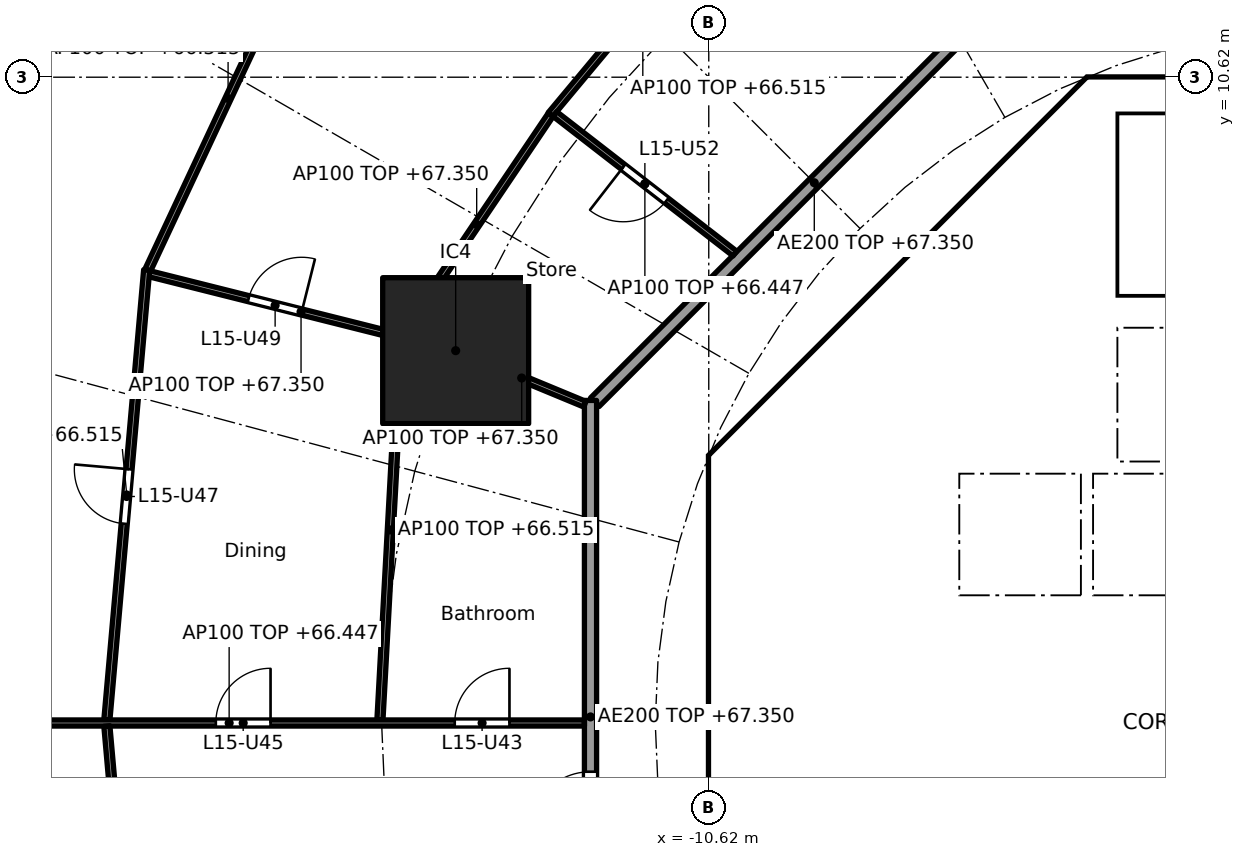
"""IFC4 building model, lengths in metres.
Left out: names, types, materials, properties, quantities, classifications, styles, units other than length and angle.
Written with IfcOpenShell. Run it as: python <this file> out.ifc"""

import sys

from ifc_helpers import new_model, si_unit, direction, frame, frame_2d, origin, origin_2d, place, context, subcontext, project, spatial, polyline, rectangle, outline, extrude, element, fill, save


model = new_model("IFC4")
c1 = context("Model", 3, precision=1e-05, world=origin(), true_north=direction((0.0, 1.0)))
c2 = subcontext(c1, "Body", "Model", "MODEL_VIEW")
j1 = project(units=[si_unit("LENGTHUNIT", "METRE"), si_unit("PLANEANGLEUNIT", "RADIAN")], contexts=[c1])
p1 = place(None, origin())
s1 = spatial("IfcSite", under=j1, at=p1, CompositionType="ELEMENT")
p2 = place(p1, origin())
s2 = spatial("IfcBuilding", under=s1, at=p2, CompositionType="ELEMENT")
p3 = place(p2, frame((0.0, 0.0, 64.0)))
s3 = spatial("IfcBuildingStorey", under=s2, at=p3, CompositionType="ELEMENT", Elevation=64.0)
p4 = place(p3, frame((-14.782, 6.123, 0.0), z_axis=(0.0, 0.0, 1.0), x_axis=(1.0, 0.0, 0.0)))
e1 = element("IfcColumn", 1, at=p4, inside=s3, PredefinedType="COLUMN", context=c2, shape_type="SweptSolid", body=[
    extrude(rectangle(XDim=2.4, YDim=2.4, at=origin_2d()), origin(), (0.0, 0.0, 1.0), 3.7),
])
p5 = place(p3, frame((-4.613, 9.988, 0.0), z_axis=(0.0, 0.0, 1.0), x_axis=(-0.707106781187, -0.707106781187, 0.0)))
e2 = element("IfcWall", 2, at=p5, inside=s3, PredefinedType="SHEAR", context=c2, shape_type="SweptSolid", body=[
    extrude(rectangle(XDim=7.602, YDim=0.6, at=frame_2d((3.801, 0.0))), origin(), (0.0, 0.0, 1.0), 3.35),
])
p6 = place(p5, frame((0.351, 0.0, 0.0)))
e3 = element("IfcOpeningElement", 3, at=p6, cuts=e2, PredefinedType="OPENING", context=c2, shape_type="SweptSolid", body=[
    extrude(rectangle(XDim=1.1, YDim=2.1, at=frame_2d((0.55, 1.05))), frame((0.0, 0.31, 0.0), z_axis=(0.0, -1.0, 0.0), x_axis=(1.0, 0.0, 0.0)), (0.0, 0.0, 1.0), 0.62),
])
p7 = place(p3, frame((-10.325, 3.801, 0.0), z_axis=(0.0, 0.0, 1.0), x_axis=(0.0, -1.0, 0.0)))
e4 = element("IfcWall", 4, at=p7, inside=s3, PredefinedType="SHEAR", context=c2, shape_type="SweptSolid", body=[
    extrude(rectangle(XDim=7.602, YDim=0.6, at=frame_2d((3.801, 0.0))), origin(), (0.0, 0.0, 1.0), 3.35),
])
p8 = place(p7, frame((0.651, 0.0, 0.0)))
e5 = element("IfcOpeningElement", 5, at=p8, cuts=e4, PredefinedType="OPENING", context=c2, shape_type="SweptSolid", body=[
    extrude(rectangle(XDim=1.5, YDim=2.1, at=frame_2d((0.75, 1.05))), frame((0.0, 0.31, 0.0), z_axis=(0.0, -1.0, 0.0), x_axis=(1.0, 0.0, 0.0)), (0.0, 0.0, 1.0), 0.62),
])
p9 = place(p7, frame((5.451, 0.0, 0.0)))
e6 = element("IfcOpeningElement", 6, at=p9, cuts=e4, PredefinedType="OPENING", context=c2, shape_type="SweptSolid", body=[
    extrude(rectangle(XDim=1.5, YDim=2.1, at=frame_2d((0.75, 1.05))), frame((0.0, 0.31, 0.0), z_axis=(0.0, -1.0, 0.0), x_axis=(1.0, 0.0, 0.0)), (0.0, 0.0, 1.0), 0.62),
])
p10 = place(p3, frame((-5.8, 4.3, 0.0), z_axis=(0.0, 0.0, 1.0), x_axis=(0.0, 1.0, 0.0)))
e7 = element("IfcWall", 7, at=p10, inside=s3, PredefinedType="PARTITIONING", context=c2, shape_type="SweptSolid", body=[
    extrude(rectangle(XDim=3.927, YDim=0.15, at=frame_2d((1.963, 0.0))), origin(), (0.0, 0.0, 1.0), 3.35),
])
p11 = place(p10, frame((0.413, 0.0, 0.0)))
e8 = element("IfcOpeningElement", 8, at=p11, cuts=e7, PredefinedType="OPENING", context=c2, shape_type="SweptSolid", body=[
    extrude(rectangle(XDim=0.9, YDim=2.1, at=frame_2d((0.45, 1.05))), frame((0.0, 0.085, 0.0), z_axis=(0.0, -1.0, 0.0), x_axis=(1.0, 0.0, 0.0)), (0.0, 0.0, 1.0), 0.17),
])
p12 = place(p10, frame((2.489, 0.0, 0.0)))
e9 = element("IfcOpeningElement", 9, at=p12, cuts=e7, PredefinedType="OPENING", context=c2, shape_type="SweptSolid", body=[
    extrude(rectangle(XDim=0.9, YDim=2.1, at=frame_2d((0.45, 1.05))), frame((0.0, 0.085, 0.0), z_axis=(0.0, -1.0, 0.0), x_axis=(1.0, 0.0, 0.0)), (0.0, 0.0, 1.0), 0.17),
])
p13 = place(p3, frame((-4.0, 4.3, 0.0), z_axis=(0.0, 0.0, 1.0), x_axis=(0.0, 1.0, 0.0)))
e10 = element("IfcWall", 10, at=p13, inside=s3, PredefinedType="SOLIDWALL", context=c2, shape_type="SweptSolid", body=[
    extrude(rectangle(XDim=2.2, YDim=0.2, at=frame_2d((1.1, 0.0))), origin(), (0.0, 0.0, 1.0), 3.35),
])
p14 = place(p13, frame((0.55, 0.0, 0.0)))
e11 = element("IfcOpeningElement", 11, at=p14, cuts=e10, PredefinedType="OPENING", context=c2, shape_type="SweptSolid", body=[
    extrude(rectangle(XDim=1.1, YDim=2.1, at=frame_2d((0.55, 1.05))), frame((0.0, 0.11, 0.0), z_axis=(0.0, -1.0, 0.0), x_axis=(1.0, 0.0, 0.0)), (0.0, 0.0, 1.0), 0.22),
])
p15 = place(p3, frame((-6.7, 2.0, 0.0), z_axis=(0.0, 0.0, 1.0), x_axis=(1.0, 0.0, 0.0)))
e12 = element("IfcWall", 12, at=p15, inside=s3, PredefinedType="SOLIDWALL", context=c2, shape_type="SweptSolid", body=[
    extrude(rectangle(XDim=13.4, YDim=0.2, at=frame_2d((6.7, 0.0))), origin(), (0.0, 0.0, 1.0), 3.35),
])
p16 = place(p15, frame((0.65, 0.0, 0.0)))
e13 = element("IfcOpeningElement", 13, at=p16, cuts=e12, PredefinedType="OPENING", context=c2, shape_type="SweptSolid", body=[
    extrude(rectangle(XDim=1.1, YDim=2.1, at=frame_2d((0.55, 1.05))), frame((0.0, 0.11, 0.0), z_axis=(0.0, -1.0, 0.0), x_axis=(1.0, 0.0, 0.0)), (0.0, 0.0, 1.0), 0.22),
])
p17 = place(p15, frame((2.85, 0.0, 0.0)))
e14 = element("IfcOpeningElement", 14, at=p17, cuts=e12, PredefinedType="OPENING", context=c2, shape_type="SweptSolid", body=[
    extrude(rectangle(XDim=1.1, YDim=2.1, at=frame_2d((0.55, 1.05))), frame((0.0, 0.11, 0.0), z_axis=(0.0, -1.0, 0.0), x_axis=(1.0, 0.0, 0.0)), (0.0, 0.0, 1.0), 0.22),
])
p18 = place(p15, frame((5.05, 0.0, 0.0)))
e15 = element("IfcOpeningElement", 15, at=p18, cuts=e12, PredefinedType="OPENING", context=c2, shape_type="SweptSolid", body=[
    extrude(rectangle(XDim=1.1, YDim=2.1, at=frame_2d((0.55, 1.05))), frame((0.0, 0.11, 0.0), z_axis=(0.0, -1.0, 0.0), x_axis=(1.0, 0.0, 0.0)), (0.0, 0.0, 1.0), 0.22),
])
p19 = place(p3, origin())
e16 = element("IfcWall", 16, at=p19, inside=s3, PredefinedType="SHEAR", context=c2, shape_type="SweptSolid", body=[
    extrude(outline(polyline([(-10.2, 4.825), (-9.776, 4.401), (-10.025, 4.152), (-10.025, 3.801), (-10.625, 3.801), (-10.625, 4.401), (-10.2, 4.825)])), origin(), (0.0, 0.0, 1.0), 3.35),
])
p20 = place(p3, origin())
e17 = element("IfcWall", 17, at=p20, inside=s3, PredefinedType="SHEAR", context=c2, shape_type="SweptSolid", body=[
    extrude(outline(polyline([(-4.152, 10.025), (-4.401, 9.776), (-4.825, 10.2), (-4.401, 10.625), (4.401, 10.625), (4.825, 10.2), (4.401, 9.776), (4.152, 10.025), (-4.152, 10.025)])), origin(), (0.0, 0.0, 1.0), 3.35),
])
p21 = place(p3, frame((-10.025, 4.0, 0.0), z_axis=(0.0, 0.0, 1.0), x_axis=(1.0, 0.0, 0.0)))
e18 = element("IfcWall", 18, at=p21, inside=s3, PredefinedType="PARTITIONING", context=c2, shape_type="SweptSolid", body=[
    extrude(rectangle(XDim=3.325, YDim=0.2, at=frame_2d((1.662, 0.0))), origin(), (0.0, 0.0, 1.0), 3.35),
])
p22 = place(p3, frame((-8.001, 6.1, 0.0), z_axis=(0.0, 0.0, 1.0), x_axis=(1.0, 0.0, 0.0)))
e19 = element("IfcWall", 19, at=p22, inside=s3, PredefinedType="PARTITIONING", context=c2, shape_type="SweptSolid", body=[
    extrude(rectangle(XDim=2.126, YDim=0.15, at=frame_2d((1.063, 0.0))), origin(), (0.0, 0.0, 1.0), 3.35),
])
p23 = place(p3, origin())
e20 = element("IfcWall", 20, at=p23, inside=s3, PredefinedType="SOLIDWALL", context=c2, shape_type="SweptSolid", body=[
    extrude(outline(polyline([(-6.5, 2.1), (-6.7, 2.1), (-6.7, 4.3), (6.7, 4.3), (6.7, 2.1), (6.5, 2.1), (6.5, 4.1), (4.5, 4.1), (4.5, 2.1), (4.3, 2.1), (4.3, 4.1), (2.3, 4.1), (2.3, 2.1), (2.1, 2.1), (2.1, 4.1), (0.1, 4.1), (0.1, 2.1), (-0.1, 2.1), (-0.1, 4.1), (-2.1, 4.1), (-2.1, 2.1), (-2.3, 2.1), (-2.3, 4.1), (-4.3, 4.1), (-4.3, 2.1), (-4.5, 2.1), (-4.5, 4.1), (-6.5, 4.1), (-6.5, 2.1)])), origin(), (0.0, 0.0, 1.0), 3.35),
])
p24 = place(p3, origin())
e21 = element("IfcWall", 21, at=p24, inside=s3, PredefinedType="SOLIDWALL", context=c2, shape_type="SweptSolid", body=[
    extrude(outline(polyline([(-3.9, 7.025), (-4.1, 7.025), (-4.1, 10.025), (-3.9, 10.025), (-3.9, 7.025)])), origin(), (0.0, 0.0, 1.0), 3.35),
])
p25 = place(p3, origin())
e22 = element("IfcWall", 22, at=p25, inside=s3, PredefinedType="SOLIDWALL", context=c2, shape_type="SweptSolid", body=[
    extrude(outline(polyline([(4.1, 6.5), (-4.1, 6.5), (-4.1, 7.025), (4.1, 7.025), (4.1, 6.5)])), origin(), (0.0, 0.0, 1.0), 3.35),
])
p26 = place(p3, frame((-5.275, 12.494, 0.0), z_axis=(0.0, 0.0, 1.0), x_axis=(-0.707106781187, -0.707106781187, 0.0)))
e23 = element("IfcWall", 23, at=p26, inside=s3, PredefinedType="PARTITIONING", context=c2, shape_type="SweptSolid", body=[
    extrude(rectangle(XDim=10.209, YDim=0.2, at=frame_2d((5.104, 0.0))), origin(), (0.0, 0.0, 1.0), 3.35),
])
p27 = place(p3, frame((-12.565, 5.304, 0.0), z_axis=(0.0, 0.0, 1.0), x_axis=(0.0, -1.0, 0.0)))
e24 = element("IfcWall", 24, at=p27, inside=s3, PredefinedType="PARTITIONING", context=c2, shape_type="SweptSolid", body=[
    extrude(rectangle(XDim=10.409, YDim=0.2, at=frame_2d((5.205, 0.0))), origin(), (0.0, 0.0, 1.0), 3.35),
])
p28 = place(p27, frame((6.106, 0.0, 0.0)))
e25 = element("IfcOpeningElement", 25, at=p28, cuts=e24, PredefinedType="OPENING", context=c2, shape_type="SweptSolid", body=[
    extrude(rectangle(XDim=1.0, YDim=2.1, at=frame_2d((0.5, 1.05))), frame((0.0, 0.11, 0.0), z_axis=(0.0, -1.0, 0.0), x_axis=(1.0, 0.0, 0.0)), (0.0, 0.0, 1.0), 0.22),
])
p29 = place(p3, frame((-10.187, 13.643, 0.0), z_axis=(0.0, 0.0, 1.0), x_axis=(-0.640807748916, -0.767701393075, 0.0)))
e26 = element("IfcWall", 26, at=p29, inside=s3, PredefinedType="PARTITIONING", context=c2, shape_type="SweptSolid", body=[
    extrude(rectangle(XDim=4.737, YDim=0.1, at=frame_2d((2.368, 0.0))), origin(), (0.0, 0.0, 1.0), 2.515),
])
p30 = place(p29, frame((1.893, 0.0, 0.0)))
e27 = element("IfcOpeningElement", 27, at=p30, cuts=e26, PredefinedType="OPENING", context=c2, shape_type="SweptSolid", body=[
    extrude(rectangle(XDim=0.9, YDim=2.1, at=frame_2d((0.45, 1.05))), frame((0.0, 0.06, 0.0), z_axis=(0.0, -1.0, 0.0), x_axis=(1.0, 0.0, 0.0)), (0.0, 0.0, 1.0), 0.12),
])
p31 = place(p3, frame((-10.19, 7.719, 0.0), z_axis=(0.0, 0.0, 1.0), x_axis=(-0.790253294643, 0.612780327937, 0.0)))
e28 = element("IfcWall", 28, at=p31, inside=s3, PredefinedType="PARTITIONING", context=c2, shape_type="SweptSolid", body=[
    extrude(rectangle(XDim=3.746, YDim=0.1, at=frame_2d((1.873, 0.0))), origin(), (0.0, 0.0, 1.0), 2.447),
])
p32 = place(p31, frame((1.423, 0.0, 0.0)))
e29 = element("IfcOpeningElement", 29, at=p32, cuts=e28, PredefinedType="OPENING", context=c2, shape_type="SweptSolid", body=[
    extrude(rectangle(XDim=0.9, YDim=2.1, at=frame_2d((0.45, 1.05))), frame((0.0, 0.06, 0.0), z_axis=(0.0, -1.0, 0.0), x_axis=(1.0, 0.0, 0.0)), (0.0, 0.0, 1.0), 0.12),
])
p33 = place(p3, frame((-13.218, 10.004, 0.0), z_axis=(0.0, 0.0, 1.0), x_axis=(-0.559126445155, -0.82908239538, 0.0)))
e30 = element("IfcWall", 30, at=p33, inside=s3, PredefinedType="PARTITIONING", context=c2, shape_type="SweptSolid", body=[
    extrude(rectangle(XDim=4.358, YDim=0.1, at=frame_2d((2.179, 0.0))), origin(), (0.0, 0.0, 1.0), 3.35),
])
p34 = place(p3, frame((-17.203, 13.095, 0.0), z_axis=(0.0, 0.0, 1.0), x_axis=(-0.423892287987, -0.905712607942, 0.0)))
e31 = element("IfcWall", 31, at=p34, inside=s3, PredefinedType="PARTITIONING", context=c2, shape_type="SweptSolid", body=[
    extrude(rectangle(XDim=6.238, YDim=0.1, at=frame_2d((3.119, 0.0))), origin(), (0.0, 0.0, 1.0), 2.515),
])
p35 = place(p3, frame((-12.657, 5.243, 0.0), z_axis=(0.0, 0.0, 1.0), x_axis=(-0.923864733477, 0.382719158442, 0.0)))
e32 = element("IfcWall", 32, at=p35, inside=s3, PredefinedType="PARTITIONING", context=c2, shape_type="SweptSolid", body=[
    extrude(rectangle(XDim=2.25, YDim=0.1, at=frame_2d((1.125, 0.0))), origin(), (0.0, 0.0, 1.0), 3.35),
])
p36 = place(p3, frame((-14.831, 6.135, 0.0), z_axis=(0.0, 0.0, 1.0), x_axis=(-0.96988230015, 0.243574062362, 0.0)))
e33 = element("IfcWall", 33, at=p36, inside=s3, PredefinedType="PARTITIONING", context=c2, shape_type="SweptSolid", body=[
    extrude(rectangle(XDim=5.144, YDim=0.1, at=frame_2d((2.572, 0.0))), origin(), (0.0, 0.0, 1.0), 3.35),
])
p37 = place(p36, frame((2.561, 0.0, 0.0)))
e34 = element("IfcOpeningElement", 34, at=p37, cuts=e33, PredefinedType="OPENING", context=c2, shape_type="SweptSolid", body=[
    extrude(rectangle(XDim=0.9, YDim=2.1, at=frame_2d((0.45, 1.05))), frame((0.0, 0.06, 0.0), z_axis=(0.0, -1.0, 0.0), x_axis=(1.0, 0.0, 0.0)), (0.0, 0.0, 1.0), 0.12),
])
p38 = place(p3, frame((-15.686, 6.299, 0.0), z_axis=(0.0, 0.0, 1.0), x_axis=(-0.054651178503, -0.99850550759, 0.0)))
e35 = element("IfcWall", 35, at=p38, inside=s3, PredefinedType="PARTITIONING", context=c2, shape_type="SweptSolid", body=[
    extrude(rectangle(XDim=6.259, YDim=0.1, at=frame_2d((3.129, 0.0))), origin(), (0.0, 0.0, 1.0), 2.515),
])
p39 = place(p3, frame((-19.864, 7.45, 0.0), z_axis=(0.0, 0.0, 1.0), x_axis=(-0.088138375539, -0.996108240483, 0.0)))
e36 = element("IfcWall", 36, at=p39, inside=s3, PredefinedType="PARTITIONING", context=c2, shape_type="SweptSolid", body=[
    extrude(rectangle(XDim=7.429, YDim=0.1, at=frame_2d((3.714, 0.0))), origin(), (0.0, 0.0, 1.0), 2.515),
])
p40 = place(p39, frame((3.29, 0.0, 0.0)))
e37 = element("IfcOpeningElement", 37, at=p40, cuts=e36, PredefinedType="OPENING", context=c2, shape_type="SweptSolid", body=[
    extrude(rectangle(XDim=0.9, YDim=2.1, at=frame_2d((0.45, 1.05))), frame((0.0, 0.06, 0.0), z_axis=(0.0, -1.0, 0.0), x_axis=(1.0, 0.0, 0.0)), (0.0, 0.0, 1.0), 0.12),
])
p41 = place(p3, frame((-12.665, 0.0, 0.0), z_axis=(0.0, 0.0, 1.0), x_axis=(-1.0, 0.0, 0.0)))
e38 = element("IfcWall", 38, at=p41, inside=s3, PredefinedType="PARTITIONING", context=c2, shape_type="SweptSolid", body=[
    extrude(rectangle(XDim=11.685, YDim=0.1, at=frame_2d((5.843, 0.0))), origin(), (0.0, 0.0, 1.0), 2.447),
])
p42 = place(p41, frame((1.233, 0.0, 0.0)))
e39 = element("IfcOpeningElement", 39, at=p42, cuts=e38, PredefinedType="OPENING", context=c2, shape_type="SweptSolid", body=[
    extrude(rectangle(XDim=0.9, YDim=2.1, at=frame_2d((0.45, 1.05))), frame((0.0, 0.06, 0.0), z_axis=(0.0, -1.0, 0.0), x_axis=(1.0, 0.0, 0.0)), (0.0, 0.0, 1.0), 0.12),
])
p43 = place(p41, frame((5.162, 0.0, 0.0)))
e40 = element("IfcOpeningElement", 40, at=p43, cuts=e38, PredefinedType="OPENING", context=c2, shape_type="SweptSolid", body=[
    extrude(rectangle(XDim=0.9, YDim=2.1, at=frame_2d((0.45, 1.05))), frame((0.0, 0.06, 0.0), z_axis=(0.0, -1.0, 0.0), x_axis=(1.0, 0.0, 0.0)), (0.0, 0.0, 1.0), 0.12),
])
p44 = place(p41, frame((9.322, 0.0, 0.0)))
e41 = element("IfcOpeningElement", 41, at=p44, cuts=e38, PredefinedType="OPENING", context=c2, shape_type="SweptSolid", body=[
    extrude(rectangle(XDim=0.9, YDim=2.1, at=frame_2d((0.45, 1.05))), frame((0.0, 0.06, 0.0), z_axis=(0.0, -1.0, 0.0), x_axis=(1.0, 0.0, 0.0)), (0.0, 0.0, 1.0), 0.12),
])
p45 = place(p3, frame((-20.518, -0.05, 0.0), z_axis=(0.0, 0.0, 1.0), x_axis=(0.088143415068, -0.996107794558, 0.0)))
e42 = element("IfcWall", 42, at=p45, inside=s3, PredefinedType="PARTITIONING", context=c2, shape_type="SweptSolid", body=[
    extrude(rectangle(XDim=7.279, YDim=0.1, at=frame_2d((3.64, 0.0))), origin(), (0.0, 0.0, 1.0), 2.515),
])
p46 = place(p16, origin())
e43 = element("IfcDoor", 43, at=p46, inside=s3, OperationType="DOUBLE_DOOR_SLIDING", PredefinedType="DOOR", context=c2, shape_type="SweptSolid", body=[
    extrude(rectangle(XDim=1.1, YDim=2.1, at=frame_2d((0.55, 1.05))), frame((0.0, 0.025, 0.0), z_axis=(0.0, -1.0, 0.0), x_axis=(1.0, 0.0, 0.0)), (0.0, 0.0, 1.0), 0.05),
])
fill(e13, e43)
p47 = place(p17, origin())
e44 = element("IfcDoor", 44, at=p47, inside=s3, OperationType="DOUBLE_DOOR_SLIDING", PredefinedType="DOOR", context=c2, shape_type="SweptSolid", body=[
    extrude(rectangle(XDim=1.1, YDim=2.1, at=frame_2d((0.55, 1.05))), frame((0.0, 0.025, 0.0), z_axis=(0.0, -1.0, 0.0), x_axis=(1.0, 0.0, 0.0)), (0.0, 0.0, 1.0), 0.05),
])
fill(e14, e44)
p48 = place(p14, origin())
e45 = element("IfcDoor", 45, at=p48, inside=s3, OperationType="DOUBLE_DOOR_SLIDING", PredefinedType="DOOR", context=c2, shape_type="SweptSolid", body=[
    extrude(rectangle(XDim=1.1, YDim=2.1, at=frame_2d((0.55, 1.05))), frame((0.0, 0.025, 0.0), z_axis=(0.0, -1.0, 0.0), x_axis=(1.0, 0.0, 0.0)), (0.0, 0.0, 1.0), 0.05),
])
fill(e11, e45)
p49 = place(p11, origin())
e46 = element("IfcDoor", 46, at=p49, inside=s3, OperationType="SINGLE_SWING_LEFT", PredefinedType="DOOR", context=c2, shape_type="SweptSolid", body=[
    extrude(rectangle(XDim=0.9, YDim=2.1, at=frame_2d((0.45, 1.05))), frame((0.0, 0.025, 0.0), z_axis=(0.0, -1.0, 0.0), x_axis=(1.0, 0.0, 0.0)), (0.0, 0.0, 1.0), 0.05),
])
fill(e8, e46)
p50 = place(p12, origin())
e47 = element("IfcDoor", 47, at=p50, inside=s3, OperationType="SINGLE_SWING_LEFT", PredefinedType="DOOR", context=c2, shape_type="SweptSolid", body=[
    extrude(rectangle(XDim=0.9, YDim=2.1, at=frame_2d((0.45, 1.05))), frame((0.0, 0.025, 0.0), z_axis=(0.0, -1.0, 0.0), x_axis=(1.0, 0.0, 0.0)), (0.0, 0.0, 1.0), 0.05),
])
fill(e9, e47)
p51 = place(p8, origin())
e48 = element("IfcDoor", 48, at=p51, inside=s3, OperationType="DOUBLE_DOOR_SINGLE_SWING", PredefinedType="DOOR", context=c2, shape_type="SweptSolid", body=[
    extrude(rectangle(XDim=1.5, YDim=2.1, at=frame_2d((0.75, 1.05))), frame((0.0, 0.025, 0.0), z_axis=(0.0, -1.0, 0.0), x_axis=(1.0, 0.0, 0.0)), (0.0, 0.0, 1.0), 0.05),
])
fill(e5, e48)
p52 = place(p6, origin())
e49 = element("IfcDoor", 49, at=p52, inside=s3, OperationType="SINGLE_SWING_RIGHT", PredefinedType="DOOR", context=c2, shape_type="SweptSolid", body=[
    extrude(rectangle(XDim=1.1, YDim=2.1, at=frame_2d((0.55, 1.05))), frame((0.0, 0.025, 0.0), z_axis=(0.0, -1.0, 0.0), x_axis=(1.0, 0.0, 0.0)), (0.0, 0.0, 1.0), 0.05),
])
fill(e3, e49)
p53 = place(p28, frame((1.0, 0.0, 0.0), x_axis=(-1.0, 0.0, 0.0)))
e50 = element("IfcDoor", 50, at=p53, inside=s3, OperationType="SINGLE_SWING_LEFT", PredefinedType="DOOR", context=c2, shape_type="SweptSolid", body=[
    extrude(rectangle(XDim=1.0, YDim=2.1, at=frame_2d((0.5, 1.05))), frame((0.0, 0.025, 0.0), z_axis=(0.0, -1.0, 0.0), x_axis=(1.0, 0.0, 0.0)), (0.0, 0.0, 1.0), 0.05),
])
fill(e25, e50)
p54 = place(p42, frame((0.9, 0.0, 0.0), x_axis=(-1.0, 0.0, 0.0)))
e51 = element("IfcDoor", 51, at=p54, inside=s3, OperationType="SINGLE_SWING_RIGHT", PredefinedType="DOOR", context=c2, shape_type="SweptSolid", body=[
    extrude(rectangle(XDim=0.9, YDim=2.1, at=frame_2d((0.45, 1.05))), frame((0.0, 0.025, 0.0), z_axis=(0.0, -1.0, 0.0), x_axis=(1.0, 0.0, 0.0)), (0.0, 0.0, 1.0), 0.05),
])
fill(e39, e51)
p55 = place(p43, frame((0.9, 0.0, 0.0), x_axis=(-1.0, 0.0, 0.0)))
e52 = element("IfcDoor", 52, at=p55, inside=s3, OperationType="SINGLE_SWING_RIGHT", PredefinedType="DOOR", context=c2, shape_type="SweptSolid", body=[
    extrude(rectangle(XDim=0.9, YDim=2.1, at=frame_2d((0.45, 1.05))), frame((0.0, 0.025, 0.0), z_axis=(0.0, -1.0, 0.0), x_axis=(1.0, 0.0, 0.0)), (0.0, 0.0, 1.0), 0.05),
])
fill(e40, e52)
p56 = place(p40, frame((0.9, 0.0, 0.0), x_axis=(-1.0, 0.0, 0.0)))
e53 = element("IfcDoor", 53, at=p56, inside=s3, OperationType="SINGLE_SWING_RIGHT", PredefinedType="DOOR", context=c2, shape_type="SweptSolid", body=[
    extrude(rectangle(XDim=0.9, YDim=2.1, at=frame_2d((0.45, 1.05))), frame((0.0, 0.025, 0.0), z_axis=(0.0, -1.0, 0.0), x_axis=(1.0, 0.0, 0.0)), (0.0, 0.0, 1.0), 0.05),
])
fill(e37, e53)
p57 = place(p37, frame((0.9, 0.0, 0.0), x_axis=(-1.0, 0.0, 0.0)))
e54 = element("IfcDoor", 54, at=p57, inside=s3, OperationType="SINGLE_SWING_RIGHT", PredefinedType="DOOR", context=c2, shape_type="SweptSolid", body=[
    extrude(rectangle(XDim=0.9, YDim=2.1, at=frame_2d((0.45, 1.05))), frame((0.0, 0.025, 0.0), z_axis=(0.0, -1.0, 0.0), x_axis=(1.0, 0.0, 0.0)), (0.0, 0.0, 1.0), 0.05),
])
fill(e34, e54)
p58 = place(p32, origin())
e55 = element("IfcDoor", 55, at=p58, inside=s3, OperationType="SINGLE_SWING_RIGHT", PredefinedType="DOOR", context=c2, shape_type="SweptSolid", body=[
    extrude(rectangle(XDim=0.9, YDim=2.1, at=frame_2d((0.45, 1.05))), frame((0.0, 0.025, 0.0), z_axis=(0.0, -1.0, 0.0), x_axis=(1.0, 0.0, 0.0)), (0.0, 0.0, 1.0), 0.05),
])
fill(e29, e55)
save(model, sys.argv[1])
